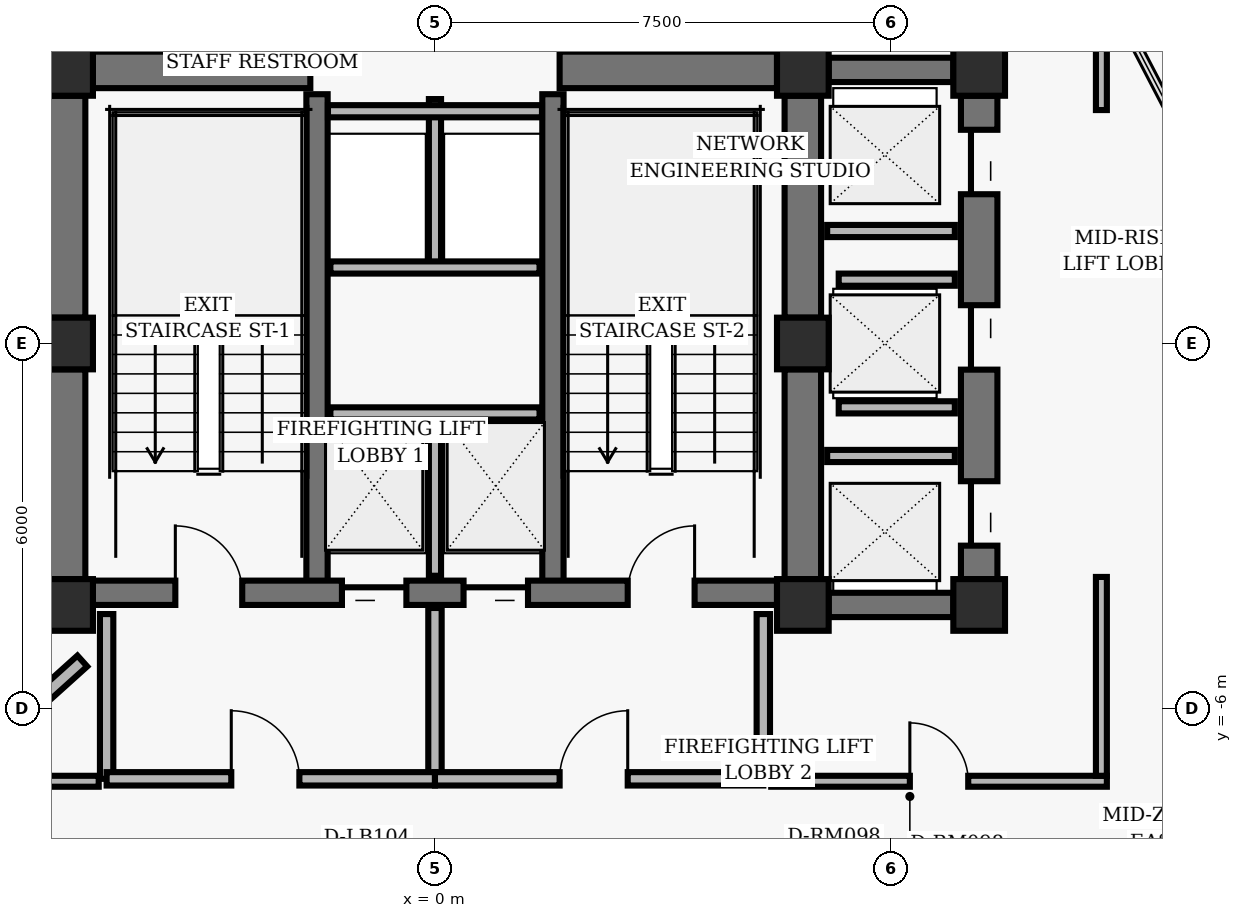
"""IFC4 building model, lengths in metres.
Left out: names, types, materials, properties, quantities, classifications, styles, units other than length and angle.
Written with IfcOpenShell. Run it as: python <this file> out.ifc"""

import sys

from ifc_helpers import new_model, si_unit, direction, frame, frame_2d, origin, origin_2d, place, context, subcontext, project, spatial, rectangle, hollow_rectangle, extrude, element, fill, save


model = new_model("IFC4")
c1 = context("Model", 3, precision=1e-05, world=origin(), true_north=direction((0.0, 1.0)))
c2 = subcontext(c1, "Body", "Model", "MODEL_VIEW")
j1 = project(units=[si_unit("LENGTHUNIT", "METRE"), si_unit("PLANEANGLEUNIT", "RADIAN")], contexts=[c1])
p1 = place(None, origin())
s1 = spatial("IfcSite", under=j1, at=p1, CompositionType="ELEMENT")
p2 = place(p1, origin())
s2 = spatial("IfcBuilding", under=s1, at=p2, CompositionType="ELEMENT")
p3 = place(p2, frame((0.0, 0.0, 135.04)))
s3 = spatial("IfcBuildingStorey", under=s2, at=p3, CompositionType="ELEMENT", Elevation=135.04)
for number, where, z_axis, x_axis in (
    (1, (-6.05, 4.5, 0.0), (0.0, 0.0, 1.0), (1.0, 0.0, 0.0)),
    (2, (6.05, 4.5, 0.0), (0.0, 0.0, 1.0), (1.0, 0.0, 0.0)),
    (3, (-6.05, 0.0, 0.0), (0.0, 0.0, 1.0), (1.0, 0.0, 0.0)),
    (4, (6.05, 0.0, 0.0), (0.0, 0.0, 1.0), (1.0, 0.0, 0.0)),
    (5, (-6.05, -4.3, 0.0), (0.0, 0.0, 1.0), (1.0, 0.0, 0.0)),
    (6, (6.05, -4.3, 0.0), (0.0, 0.0, 1.0), (1.0, 0.0, 0.0)),
    (7, (8.95, 4.5, 0.0), (0.0, 0.0, 1.0), (1.0, 0.0, 0.0)),
    (8, (8.95, -4.3, 0.0), (0.0, 0.0, 1.0), (1.0, 0.0, 0.0)),
):
    element("IfcColumn", number, at=place(p3, frame(where, z_axis=z_axis, x_axis=x_axis)), inside=s3, PredefinedType="COLUMN", context=c2, shape_type="SweptSolid", body=[
        extrude(hollow_rectangle(XDim=0.85, YDim=0.85, WallThickness=0.055, InnerFilletRadius=0.02, OuterFilletRadius=0.04, at=origin_2d()), origin(), (0.0, 0.0, 1.0), 3.04),
    ])
p4 = place(p3, frame((-6.05, 0.425, 0.0), z_axis=(0.0, 0.0, 1.0), x_axis=(0.0, 1.0, 0.0)))
e9 = element("IfcWall", 9, at=p4, inside=s3, PredefinedType="SHEAR", context=c2, shape_type="SweptSolid", body=[
    extrude(rectangle(XDim=3.65, YDim=0.6, at=frame_2d((1.825, 0.0))), origin(), (0.0, 0.0, 1.0), 2.788),
])
p5 = place(p3, frame((-6.05, -3.875, 0.0), z_axis=(0.0, 0.0, 1.0), x_axis=(0.0, 1.0, 0.0)))
e10 = element("IfcWall", 10, at=p5, inside=s3, PredefinedType="SHEAR", context=c2, shape_type="SweptSolid", body=[
    extrude(rectangle(XDim=3.45, YDim=0.6, at=frame_2d((1.725, 0.0))), origin(), (0.0, 0.0, 1.0), 2.788),
])
p6 = place(p3, frame((6.05, 0.425, 0.0), z_axis=(0.0, 0.0, 1.0), x_axis=(0.0, 1.0, 0.0)))
e11 = element("IfcWall", 11, at=p6, inside=s3, PredefinedType="SHEAR", context=c2, shape_type="SweptSolid", body=[
    extrude(rectangle(XDim=3.65, YDim=0.6, at=frame_2d((1.825, 0.0))), origin(), (0.0, 0.0, 1.0), 2.788),
])
p7 = place(p3, frame((6.05, -3.875, 0.0), z_axis=(0.0, 0.0, 1.0), x_axis=(0.0, 1.0, 0.0)))
e12 = element("IfcWall", 12, at=p7, inside=s3, PredefinedType="SHEAR", context=c2, shape_type="SweptSolid", body=[
    extrude(rectangle(XDim=3.45, YDim=0.6, at=frame_2d((1.725, 0.0))), origin(), (0.0, 0.0, 1.0), 2.788),
])
for number, where, z_axis, x_axis in (
    (13, (-1.94, -4.1, 0.0), (0.0, 0.0, 1.0), (0.0, 1.0, 0.0)),
    (14, (1.94, -4.1, 0.0), (0.0, 0.0, 1.0), (0.0, 1.0, 0.0)),
):
    element("IfcWall", number, at=place(p3, frame(where, z_axis=z_axis, x_axis=x_axis)), inside=s3, PredefinedType="SHEAR", context=c2, shape_type="SweptSolid", body=[
        extrude(rectangle(XDim=8.2, YDim=0.35, at=frame_2d((4.1, 0.0))), origin(), (0.0, 0.0, 1.0), 2.788),
    ])
p8 = place(p3, frame((-5.625, -4.1, 0.0), z_axis=(0.0, 0.0, 1.0), x_axis=(1.0, 0.0, 0.0)))
e15 = element("IfcWall", 15, at=p8, inside=s3, PredefinedType="SHEAR", context=c2, shape_type="SweptSolid", body=[
    extrude(rectangle(XDim=11.25, YDim=0.4, at=frame_2d((5.625, 0.0))), origin(), (0.0, 0.0, 1.0), 2.788),
])
p9 = place(p8, frame((1.355, 0.0, 0.0)))
e16 = element("IfcOpeningElement", 16, at=p9, cuts=e15, PredefinedType="OPENING", context=c2, shape_type="SweptSolid", body=[
    extrude(rectangle(XDim=1.1, YDim=2.04, at=frame_2d((0.55, 1.02))), frame((0.0, 0.21, 0.0), z_axis=(0.0, -1.0, 0.0), x_axis=(1.0, 0.0, 0.0)), (0.0, 0.0, 1.0), 0.42),
])
p10 = place(p8, frame((8.795, 0.0, 0.0)))
e17 = element("IfcOpeningElement", 17, at=p10, cuts=e15, PredefinedType="OPENING", context=c2, shape_type="SweptSolid", body=[
    extrude(rectangle(XDim=1.1, YDim=2.04, at=frame_2d((0.55, 1.02))), frame((0.0, 0.21, 0.0), z_axis=(0.0, -1.0, 0.0), x_axis=(1.0, 0.0, 0.0)), (0.0, 0.0, 1.0), 0.42),
])
p11 = place(p8, frame((4.095, 0.0, 0.0)))
e18 = element("IfcOpeningElement", 18, at=p11, cuts=e15, PredefinedType="OPENING", context=c2, shape_type="SweptSolid", body=[
    extrude(rectangle(XDim=1.06, YDim=2.04, at=frame_2d((0.53, 1.02))), frame((0.0, 0.21, 0.0), z_axis=(0.0, -1.0, 0.0), x_axis=(1.0, 0.0, 0.0)), (0.0, 0.0, 1.0), 0.42),
])
p12 = place(p8, frame((6.095, 0.0, 0.0)))
e19 = element("IfcOpeningElement", 19, at=p12, cuts=e15, PredefinedType="OPENING", context=c2, shape_type="SweptSolid", body=[
    extrude(rectangle(XDim=1.06, YDim=2.04, at=frame_2d((0.53, 1.02))), frame((0.0, 0.21, 0.0), z_axis=(0.0, -1.0, 0.0), x_axis=(1.0, 0.0, 0.0)), (0.0, 0.0, 1.0), 0.42),
])
for number, where, z_axis, x_axis in (
    (20, (-5.625, 4.5, 0.0), (0.0, 0.0, 1.0), (1.0, 0.0, 0.0)),
    (21, (2.05, 4.5, 0.0), (0.0, 0.0, 1.0), (1.0, 0.0, 0.0)),
):
    element("IfcWall", number, at=place(p3, frame(where, z_axis=z_axis, x_axis=x_axis)), inside=s3, PredefinedType="SHEAR", context=c2, shape_type="SweptSolid", body=[
        extrude(rectangle(XDim=3.575, YDim=0.6, at=frame_2d((1.788, 0.0))), origin(), (0.0, 0.0, 1.0), 2.788),
    ])
p13 = place(p3, frame((8.95, -3.875, 0.0), z_axis=(0.0, 0.0, 1.0), x_axis=(0.0, 1.0, 0.0)))
e22 = element("IfcWall", 22, at=p13, inside=s3, PredefinedType="SHEAR", context=c2, shape_type="SweptSolid", body=[
    extrude(rectangle(XDim=7.95, YDim=0.6, at=frame_2d((3.975, 0.0))), origin(), (0.0, 0.0, 1.0), 2.788),
])
p14 = place(p13, frame((0.55, 0.0, 0.0)))
e23 = element("IfcOpeningElement", 23, at=p14, cuts=e22, PredefinedType="OPENING", context=c2, shape_type="SweptSolid", body=[
    extrude(rectangle(XDim=1.06, YDim=2.04, at=frame_2d((0.53, 1.02))), frame((0.0, 0.31, 0.0), z_axis=(0.0, -1.0, 0.0), x_axis=(1.0, 0.0, 0.0)), (0.0, 0.0, 1.0), 0.62),
])
p15 = place(p13, frame((3.445, 0.0, 0.0)))
e24 = element("IfcOpeningElement", 24, at=p15, cuts=e22, PredefinedType="OPENING", context=c2, shape_type="SweptSolid", body=[
    extrude(rectangle(XDim=1.06, YDim=2.04, at=frame_2d((0.53, 1.02))), frame((0.0, 0.31, 0.0), z_axis=(0.0, -1.0, 0.0), x_axis=(1.0, 0.0, 0.0)), (0.0, 0.0, 1.0), 0.62),
])
p16 = place(p13, frame((6.33, 0.0, 0.0)))
e25 = element("IfcOpeningElement", 25, at=p16, cuts=e22, PredefinedType="OPENING", context=c2, shape_type="SweptSolid", body=[
    extrude(rectangle(XDim=1.06, YDim=2.04, at=frame_2d((0.53, 1.02))), frame((0.0, 0.31, 0.0), z_axis=(0.0, -1.0, 0.0), x_axis=(1.0, 0.0, 0.0)), (0.0, 0.0, 1.0), 0.62),
])
for number, where, z_axis, x_axis in (
    (26, (6.475, 4.5, 0.0), (0.0, 0.0, 1.0), (1.0, 0.0, 0.0)),
    (27, (6.475, -4.3, 0.0), (0.0, 0.0, 1.0), (1.0, 0.0, 0.0)),
):
    element("IfcWall", number, at=place(p3, frame(where, z_axis=z_axis, x_axis=x_axis)), inside=s3, PredefinedType="SHEAR", context=c2, shape_type="SweptSolid", body=[
        extrude(rectangle(XDim=2.05, YDim=0.4, at=frame_2d((1.025, 0.0))), origin(), (0.0, 0.0, 1.0), 2.788),
    ])
p17 = place(p3, frame((0.0, -3.82, 0.0), z_axis=(0.0, 0.0, 1.0), x_axis=(0.0, 1.0, 0.0)))
e28 = element("IfcWall", 28, at=p17, inside=s3, PredefinedType="PARTITIONING", context=c2, shape_type="SweptSolid", body=[
    extrude(rectangle(XDim=2.67, YDim=0.2, at=frame_2d((1.335, 0.0))), origin(), (0.0, 0.0, 1.0), 2.763),
])
p18 = place(p3, frame((-1.72, -1.15, 0.0), z_axis=(0.0, 0.0, 1.0), x_axis=(1.0, 0.0, 0.0)))
e29 = element("IfcWall", 29, at=p18, inside=s3, PredefinedType="PARTITIONING", context=c2, shape_type="SweptSolid", body=[
    extrude(rectangle(XDim=3.44, YDim=0.2, at=frame_2d((1.72, 0.0))), origin(), (0.0, 0.0, 1.0), 2.763),
])
for number, where, z_axis, x_axis in (
    (30, (-5.4, -7.16, 0.0), (0.0, 0.0, 1.0), (0.0, 1.0, 0.0)),
    (31, (5.4, -7.16, 0.0), (0.0, 0.0, 1.0), (0.0, 1.0, 0.0)),
):
    element("IfcWall", number, at=place(p3, frame(where, z_axis=z_axis, x_axis=x_axis)), inside=s3, PredefinedType="PARTITIONING", context=c2, shape_type="SweptSolid", body=[
        extrude(rectangle(XDim=2.71, YDim=0.22, at=frame_2d((1.355, 0.0))), origin(), (0.0, 0.0, 1.0), 2.763),
    ])
p19 = place(p3, frame((0.0, -7.16, 0.0), z_axis=(0.0, 0.0, 1.0), x_axis=(0.0, 1.0, 0.0)))
e32 = element("IfcWall", 32, at=p19, inside=s3, PredefinedType="PARTITIONING", context=c2, shape_type="SweptSolid", body=[
    extrude(rectangle(XDim=2.81, YDim=0.22, at=frame_2d((1.405, 0.0))), origin(), (0.0, 0.0, 1.0), 2.763),
])
p20 = place(p3, frame((-5.4, -7.16, 0.0), z_axis=(0.0, 0.0, 1.0), x_axis=(1.0, 0.0, 0.0)))
e33 = element("IfcWall", 33, at=p20, inside=s3, PredefinedType="PARTITIONING", context=c2, shape_type="SweptSolid", body=[
    extrude(rectangle(XDim=5.4, YDim=0.22, at=frame_2d((2.7, 0.0))), origin(), (0.0, 0.0, 1.0), 2.33),
])
p21 = place(p20, frame((2.05, 0.0, 0.0)))
e34 = element("IfcOpeningElement", 34, at=p21, cuts=e33, PredefinedType="OPENING", context=c2, shape_type="SweptSolid", body=[
    extrude(rectangle(XDim=1.12, YDim=2.02, at=frame_2d((0.56, 1.01))), frame((0.0, 0.12, 0.0), z_axis=(0.0, -1.0, 0.0), x_axis=(1.0, 0.0, 0.0)), (0.0, 0.0, 1.0), 0.24),
])
p22 = place(p3, frame((0.0, -7.16, 0.0), z_axis=(0.0, 0.0, 1.0), x_axis=(1.0, 0.0, 0.0)))
e35 = element("IfcWall", 35, at=p22, inside=s3, PredefinedType="PARTITIONING", context=c2, shape_type="SweptSolid", body=[
    extrude(rectangle(XDim=5.4, YDim=0.22, at=frame_2d((2.7, 0.0))), origin(), (0.0, 0.0, 1.0), 2.33),
])
p23 = place(p22, frame((2.05, 0.0, 0.0)))
e36 = element("IfcOpeningElement", 36, at=p23, cuts=e35, PredefinedType="OPENING", context=c2, shape_type="SweptSolid", body=[
    extrude(rectangle(XDim=1.12, YDim=2.02, at=frame_2d((0.56, 1.01))), frame((0.0, 0.12, 0.0), z_axis=(0.0, -1.0, 0.0), x_axis=(1.0, 0.0, 0.0)), (0.0, 0.0, 1.0), 0.24),
])
p24 = place(p3, frame((0.0, 1.25, 0.0), z_axis=(0.0, 0.0, 1.0), x_axis=(0.0, 1.0, 0.0)))
e37 = element("IfcWall", 37, at=p24, inside=s3, PredefinedType="PARTITIONING", context=c2, shape_type="SweptSolid", body=[
    extrude(rectangle(XDim=2.77, YDim=0.2, at=frame_2d((1.385, 0.0))), origin(), (0.0, 0.0, 1.0), 2.763),
])
p25 = place(p3, frame((-1.72, 1.25, 0.0), z_axis=(0.0, 0.0, 1.0), x_axis=(1.0, 0.0, 0.0)))
e38 = element("IfcWall", 38, at=p25, inside=s3, PredefinedType="PARTITIONING", context=c2, shape_type="SweptSolid", body=[
    extrude(rectangle(XDim=3.44, YDim=0.2, at=frame_2d((1.72, 0.0))), origin(), (0.0, 0.0, 1.0), 2.763),
])
p26 = place(p3, frame((-1.76, 3.82, 0.0), z_axis=(0.0, 0.0, 1.0), x_axis=(1.0, 0.0, 0.0)))
e39 = element("IfcWall", 39, at=p26, inside=s3, PredefinedType="PARTITIONING", context=c2, shape_type="SweptSolid", body=[
    extrude(rectangle(XDim=3.52, YDim=0.2, at=frame_2d((1.76, 0.0))), origin(), (0.0, 0.0, 1.0), 2.763),
])
for number, where, z_axis, x_axis in (
    (40, (6.45, -1.85, 0.0), (0.0, 0.0, 1.0), (1.0, 0.0, 0.0)),
    (41, (6.45, 1.85, 0.0), (0.0, 0.0, 1.0), (1.0, 0.0, 0.0)),
):
    element("IfcWall", number, at=place(p3, frame(where, z_axis=z_axis, x_axis=x_axis)), inside=s3, PredefinedType="PARTITIONING", context=c2, shape_type="SweptSolid", body=[
        extrude(rectangle(XDim=2.1, YDim=0.2, at=frame_2d((1.05, 0.0))), origin(), (0.0, 0.0, 1.0), 2.763),
    ])
for number, where, z_axis, x_axis in (
    (42, (6.64, -1.05, 0.0), (0.0, 0.0, 1.0), (1.0, 0.0, 0.0)),
    (43, (6.64, 1.05, 0.0), (0.0, 0.0, 1.0), (1.0, 0.0, 0.0)),
):
    element("IfcWall", number, at=place(p3, frame(where, z_axis=z_axis, x_axis=x_axis)), inside=s3, PredefinedType="PARTITIONING", context=c2, shape_type="SweptSolid", body=[
        extrude(rectangle(XDim=1.91, YDim=0.2, at=frame_2d((0.955, 0.0))), origin(), (0.0, 0.0, 1.0), 2.763),
    ])
p27 = place(p3, frame((10.003, 9.07, 0.0), z_axis=(0.0, 0.0, 1.0), x_axis=(0.461740291408, -0.887015165198, 0.0)))
e44 = element("IfcWall", 44, at=p27, inside=s3, PredefinedType="PARTITIONING", context=c2, shape_type="SweptSolid", body=[
    extrude(rectangle(XDim=9.976, YDim=0.18, at=frame_2d((4.988, 0.0))), origin(), (0.0, 0.0, 1.0), 2.763),
])
p28 = place(p27, frame((0.301, 0.0, 0.0)))
e45 = element("IfcOpeningElement", 45, at=p28, cuts=e44, PredefinedType="OPENING", context=c2, shape_type="SweptSolid", body=[
    extrude(rectangle(XDim=0.96, YDim=2.02, at=frame_2d((0.48, 1.01))), frame((0.0, 0.1, 0.0), z_axis=(0.0, -1.0, 0.0), x_axis=(1.0, 0.0, 0.0)), (0.0, 0.0, 1.0), 0.2),
])
p29 = place(p3, frame((5.53, -7.2, 0.0), z_axis=(0.0, 0.0, 1.0), x_axis=(1.0, 0.0, 0.0)))
e46 = element("IfcWall", 46, at=p29, inside=s3, PredefinedType="PARTITIONING", context=c2, shape_type="SweptSolid", body=[
    extrude(rectangle(XDim=5.52, YDim=0.18, at=frame_2d((2.76, 0.0))), origin(), (0.0, 0.0, 1.0), 2.33),
])
p30 = place(p29, frame((2.28, 0.0, 0.0)))
e47 = element("IfcOpeningElement", 47, at=p30, cuts=e46, PredefinedType="OPENING", context=c2, shape_type="SweptSolid", body=[
    extrude(rectangle(XDim=0.96, YDim=2.02, at=frame_2d((0.48, 1.01))), frame((0.0, 0.1, 0.0), z_axis=(0.0, -1.0, 0.0), x_axis=(1.0, 0.0, 0.0)), (0.0, 0.0, 1.0), 0.2),
])
for number, where, z_axis, x_axis in (
    (48, (10.96, -7.11, 0.0), (0.0, 0.0, 1.0), (0.0, 1.0, 0.0)),
    (49, (10.96, 3.84, 0.0), (0.0, 0.0, 1.0), (0.0, 1.0, 0.0)),
):
    element("IfcWall", number, at=place(p3, frame(where, z_axis=z_axis, x_axis=x_axis)), inside=s3, PredefinedType="PARTITIONING", context=c2, shape_type="SweptSolid", body=[
        extrude(rectangle(XDim=3.271, YDim=0.18, at=frame_2d((1.635, 0.0))), origin(), (0.0, 0.0, 1.0), 2.763),
    ])
p31 = place(p3, frame((-6.59, -7.2, 0.0), z_axis=(0.0, 0.0, 1.0), x_axis=(1.0, 0.0, 0.0)))
e50 = element("IfcWall", 50, at=p31, inside=s3, PredefinedType="PARTITIONING", context=c2, shape_type="SweptSolid", body=[
    extrude(rectangle(XDim=1.06, YDim=0.18, at=frame_2d((0.53, 0.0))), origin(), (0.0, 0.0, 1.0), 2.33),
])
p32 = place(p3, frame((-5.8, -5.222, 0.0), z_axis=(0.0, 0.0, 1.0), x_axis=(-0.743163145085, -0.669110259813, 0.0)))
e51 = element("IfcWall", 51, at=p32, inside=s3, PredefinedType="PARTITIONING", context=c2, shape_type="SweptSolid", body=[
    extrude(rectangle(XDim=0.834, YDim=0.24, at=frame_2d((0.417, 0.0))), origin(), (0.0, 0.0, 1.0), 2.763),
])
p33 = place(p9, origin())
e52 = element("IfcDoor", 52, at=p33, inside=s3, OperationType="SINGLE_SWING_LEFT", PredefinedType="DOOR", context=c2, shape_type="SweptSolid", body=[
    extrude(rectangle(XDim=1.1, YDim=2.04, at=frame_2d((0.55, 1.02))), frame((0.0, 0.025, 0.0), z_axis=(0.0, -1.0, 0.0), x_axis=(1.0, 0.0, 0.0)), (0.0, 0.0, 1.0), 0.05),
])
fill(e16, e52)
p34 = place(p10, origin())
e53 = element("IfcDoor", 53, at=p34, inside=s3, OperationType="SINGLE_SWING_RIGHT", PredefinedType="DOOR", context=c2, shape_type="SweptSolid", body=[
    extrude(rectangle(XDim=1.1, YDim=2.04, at=frame_2d((0.55, 1.02))), frame((0.0, 0.025, 0.0), z_axis=(0.0, -1.0, 0.0), x_axis=(1.0, 0.0, 0.0)), (0.0, 0.0, 1.0), 0.05),
])
fill(e17, e53)
p35 = place(p11, origin())
e54 = element("IfcDoor", 54, at=p35, inside=s3, OperationType="SLIDING_TO_LEFT", PredefinedType="DOOR", context=c2, shape_type="SweptSolid", body=[
    extrude(rectangle(XDim=1.06, YDim=2.04, at=frame_2d((0.53, 1.02))), frame((0.0, 0.025, 0.0), z_axis=(0.0, -1.0, 0.0), x_axis=(1.0, 0.0, 0.0)), (0.0, 0.0, 1.0), 0.05),
])
fill(e18, e54)
p36 = place(p12, origin())
e55 = element("IfcDoor", 55, at=p36, inside=s3, OperationType="SLIDING_TO_RIGHT", PredefinedType="DOOR", context=c2, shape_type="SweptSolid", body=[
    extrude(rectangle(XDim=1.06, YDim=2.04, at=frame_2d((0.53, 1.02))), frame((0.0, 0.025, 0.0), z_axis=(0.0, -1.0, 0.0), x_axis=(1.0, 0.0, 0.0)), (0.0, 0.0, 1.0), 0.05),
])
fill(e19, e55)
p37 = place(p21, origin())
e56 = element("IfcDoor", 56, at=p37, inside=s3, OperationType="SINGLE_SWING_LEFT", PredefinedType="DOOR", context=c2, shape_type="SweptSolid", body=[
    extrude(rectangle(XDim=1.12, YDim=2.02, at=frame_2d((0.56, 1.01))), frame((0.0, 0.025, 0.0), z_axis=(0.0, -1.0, 0.0), x_axis=(1.0, 0.0, 0.0)), (0.0, 0.0, 1.0), 0.05),
])
fill(e34, e56)
p38 = place(p23, origin())
e57 = element("IfcDoor", 57, at=p38, inside=s3, OperationType="SINGLE_SWING_RIGHT", PredefinedType="DOOR", context=c2, shape_type="SweptSolid", body=[
    extrude(rectangle(XDim=1.12, YDim=2.02, at=frame_2d((0.56, 1.01))), frame((0.0, 0.025, 0.0), z_axis=(0.0, -1.0, 0.0), x_axis=(1.0, 0.0, 0.0)), (0.0, 0.0, 1.0), 0.05),
])
fill(e36, e57)
p39 = place(p14, origin())
e58 = element("IfcDoor", 58, at=p39, inside=s3, OperationType="SLIDING_TO_LEFT", PredefinedType="DOOR", context=c2, shape_type="SweptSolid", body=[
    extrude(rectangle(XDim=1.06, YDim=2.04, at=frame_2d((0.53, 1.02))), frame((0.0, 0.025, 0.0), z_axis=(0.0, -1.0, 0.0), x_axis=(1.0, 0.0, 0.0)), (0.0, 0.0, 1.0), 0.05),
])
fill(e23, e58)
p40 = place(p15, origin())
e59 = element("IfcDoor", 59, at=p40, inside=s3, OperationType="SLIDING_TO_RIGHT", PredefinedType="DOOR", context=c2, shape_type="SweptSolid", body=[
    extrude(rectangle(XDim=1.06, YDim=2.04, at=frame_2d((0.53, 1.02))), frame((0.0, 0.025, 0.0), z_axis=(0.0, -1.0, 0.0), x_axis=(1.0, 0.0, 0.0)), (0.0, 0.0, 1.0), 0.05),
])
fill(e24, e59)
p41 = place(p16, origin())
e60 = element("IfcDoor", 60, at=p41, inside=s3, OperationType="SLIDING_TO_LEFT", PredefinedType="DOOR", context=c2, shape_type="SweptSolid", body=[
    extrude(rectangle(XDim=1.06, YDim=2.04, at=frame_2d((0.53, 1.02))), frame((0.0, 0.025, 0.0), z_axis=(0.0, -1.0, 0.0), x_axis=(1.0, 0.0, 0.0)), (0.0, 0.0, 1.0), 0.05),
])
fill(e25, e60)
p42 = place(p30, origin())
e61 = element("IfcDoor", 61, at=p42, inside=s3, OperationType="SINGLE_SWING_LEFT", PredefinedType="DOOR", context=c2, shape_type="SweptSolid", body=[
    extrude(rectangle(XDim=0.96, YDim=2.02, at=frame_2d((0.48, 1.01))), frame((0.0, 0.025, 0.0), z_axis=(0.0, -1.0, 0.0), x_axis=(1.0, 0.0, 0.0)), (0.0, 0.0, 1.0), 0.05),
])
fill(e47, e61)
save(model, sys.argv[1])
